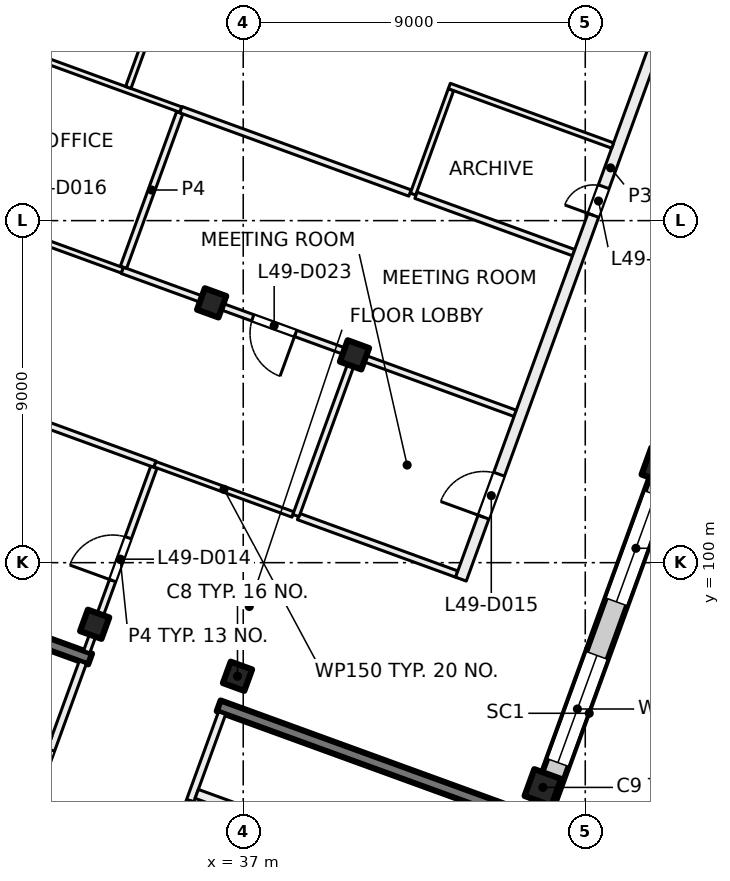
"""IFC4 building model, lengths in metres.
Left out: names, types, materials, properties, quantities, classifications, styles, units other than length and angle.
Written with IfcOpenShell. Run it as: python <this file> out.ifc"""

import sys

from ifc_helpers import new_model, si_unit, direction, frame, frame_2d, origin, origin_2d, place, context, subcontext, project, spatial, rectangle, extrude, element, fill, save


model = new_model("IFC4")
c1 = context("Model", 3, precision=1e-05, world=origin(), true_north=direction((0.0, 1.0)))
c2 = subcontext(c1, "Body", "Model", "MODEL_VIEW")
j1 = project(units=[si_unit("LENGTHUNIT", "METRE"), si_unit("PLANEANGLEUNIT", "RADIAN")], contexts=[c1])
p1 = place(None, origin())
s1 = spatial("IfcSite", under=j1, at=p1, CompositionType="ELEMENT")
p2 = place(p1, origin())
s2 = spatial("IfcBuilding", under=s1, at=p2, CompositionType="ELEMENT")
p3 = place(p2, frame((0.0, 0.0, 208.0)))
s3 = spatial("IfcBuildingStorey", under=s2, at=p3, CompositionType="ELEMENT", Elevation=208.0)
for number, where, z_axis, x_axis in (
    (1, (39.927, 105.468, 0.0), (0.0, 0.0, 1.0), (-0.342, -0.94, 0.0)),
    (2, (36.849, 97.011, 0.0), (0.0, 0.0, 1.0), (-0.342, -0.94, 0.0)),
    (3, (36.169, 106.836, 0.0), (0.0, 0.0, 1.0), (-0.342, -0.94, 0.0)),
    (4, (33.091, 98.379, 0.0), (0.0, 0.0, 1.0), (-0.342, -0.94, 0.0)),
):
    element("IfcColumn", number, at=place(p3, frame(where, z_axis=z_axis, x_axis=x_axis)), inside=s3, PredefinedType="COLUMN", context=c2, shape_type="SweptSolid", body=[
        extrude(rectangle(XDim=0.6, YDim=0.6, at=origin_2d()), origin(), (0.0, 0.0, 1.0), 4.0),
    ])
for number, where, z_axis, x_axis in (
    (5, (47.962, 102.544, 0.0), (0.0, 0.0, 1.0), (-0.342, -0.94, 0.0)),
    (6, (44.884, 94.087, 0.0), (0.0, 0.0, 1.0), (-0.342, -0.94, 0.0)),
):
    element("IfcColumn", number, at=place(p3, frame(where, z_axis=z_axis, x_axis=x_axis)), inside=s3, PredefinedType="COLUMN", context=c2, shape_type="SweptSolid", body=[
        extrude(rectangle(XDim=0.75, YDim=0.75, at=origin_2d()), origin(), (0.0, 0.0, 1.0), 4.0),
    ])
p4 = place(p3, frame((41.874, 85.232, 0.0), z_axis=(0.0, 0.0, 1.0), x_axis=(0.342020437038, 0.939692513883, 0.0)))
e7 = element("IfcWall", 7, at=p4, inside=s3, PredefinedType="SHEAR", context=c2, shape_type="SweptSolid", body=[
    extrude(rectangle(XDim=8.975, YDim=0.5, at=frame_2d((4.487, 0.0))), origin(), (0.0, 0.0, 1.0), 4.0),
])
p5 = place(p3, frame((44.529, 93.258, 0.0), z_axis=(0.0, 0.0, 1.0), x_axis=(-0.9396917844, 0.342022441267, 0.0)))
e8 = element("IfcWall", 8, at=p5, inside=s3, PredefinedType="SHEAR", context=c2, shape_type="SweptSolid", body=[
    extrude(rectangle(XDim=8.7, YDim=0.3, at=frame_2d((4.35, 0.0))), origin(), (0.0, 0.0, 1.0), 4.0),
])
p6 = place(p3, frame((32.971, 97.465, 0.0), z_axis=(0.0, 0.0, 1.0), x_axis=(-0.939695066972, 0.34201342241, 0.0)))
e9 = element("IfcWall", 9, at=p6, inside=s3, PredefinedType="SHEAR", context=c2, shape_type="SweptSolid", body=[
    extrude(rectangle(XDim=8.7, YDim=0.3, at=frame_2d((4.35, 0.0))), origin(), (0.0, 0.0, 1.0), 4.0),
])
p7 = place(p3, frame((52.212, 113.783, 0.0), z_axis=(0.0, 0.0, 1.0), x_axis=(-0.34202521188, -0.939690775968, 0.0)))
e10 = element("IfcWall", 10, at=p7, inside=s3, PredefinedType="SOLIDWALL", context=c2, shape_type="SweptSolid", body=[
    extrude(rectangle(XDim=21.745, YDim=0.6, at=frame_2d((10.873, 0.0))), origin(), (0.0, 0.0, 1.0), 3.625),
])
p8 = place(p7, frame((3.765, 0.0, 0.9)))
e11 = element("IfcOpeningElement", 11, at=p8, cuts=e10, PredefinedType="OPENING", context=c2, shape_type="SweptSolid", body=[
    extrude(rectangle(XDim=3.0, YDim=2.4, at=frame_2d((1.5, 1.2))), frame((0.0, 0.31, 0.0), z_axis=(0.0, -1.0, 0.0), x_axis=(1.0, 0.0, 0.0)), (0.0, 0.0, 1.0), 0.62),
])
p9 = place(p7, frame((8.265, 0.0, 0.9)))
e12 = element("IfcOpeningElement", 12, at=p9, cuts=e10, PredefinedType="OPENING", context=c2, shape_type="SweptSolid", body=[
    extrude(rectangle(XDim=3.0, YDim=2.4, at=frame_2d((1.5, 1.2))), frame((0.0, 0.31, 0.0), z_axis=(0.0, -1.0, 0.0), x_axis=(1.0, 0.0, 0.0)), (0.0, 0.0, 1.0), 0.62),
])
p10 = place(p7, frame((12.765, 0.0, 0.9)))
e13 = element("IfcOpeningElement", 13, at=p10, cuts=e10, PredefinedType="OPENING", context=c2, shape_type="SweptSolid", body=[
    extrude(rectangle(XDim=3.0, YDim=2.4, at=frame_2d((1.5, 1.2))), frame((0.0, 0.31, 0.0), z_axis=(0.0, -1.0, 0.0), x_axis=(1.0, 0.0, 0.0)), (0.0, 0.0, 1.0), 0.62),
])
p11 = place(p7, frame((17.265, 0.0, 0.9)))
e14 = element("IfcOpeningElement", 14, at=p11, cuts=e10, PredefinedType="OPENING", context=c2, shape_type="SweptSolid", body=[
    extrude(rectangle(XDim=3.0, YDim=2.4, at=frame_2d((1.5, 1.2))), frame((0.0, 0.31, 0.0), z_axis=(0.0, -1.0, 0.0), x_axis=(1.0, 0.0, 0.0)), (0.0, 0.0, 1.0), 0.62),
])
p12 = place(p3, frame((24.666, 100.669, 0.0), z_axis=(0.0, 0.0, 1.0), x_axis=(0.34201964167, 0.939692803373, 0.0)))
e15 = element("IfcWall", 15, at=p12, inside=s3, PredefinedType="SOLIDWALL", context=c2, shape_type="SweptSolid", body=[
    extrude(rectangle(XDim=32.884, YDim=0.6, at=frame_2d((16.442, 0.0))), origin(), (0.0, 0.0, 1.0), 3.625),
])
p13 = place(p12, frame((1.48, 0.0, 0.9)))
e16 = element("IfcOpeningElement", 16, at=p13, cuts=e15, PredefinedType="OPENING", context=c2, shape_type="SweptSolid", body=[
    extrude(rectangle(XDim=3.0, YDim=2.4, at=frame_2d((1.5, 1.2))), frame((0.0, 0.31, 0.0), z_axis=(0.0, -1.0, 0.0), x_axis=(1.0, 0.0, 0.0)), (0.0, 0.0, 1.0), 0.62),
])
p14 = place(p12, frame((5.98, 0.0, 0.9)))
e17 = element("IfcOpeningElement", 17, at=p14, cuts=e15, PredefinedType="OPENING", context=c2, shape_type="SweptSolid", body=[
    extrude(rectangle(XDim=3.0, YDim=2.4, at=frame_2d((1.5, 1.2))), frame((0.0, 0.31, 0.0), z_axis=(0.0, -1.0, 0.0), x_axis=(1.0, 0.0, 0.0)), (0.0, 0.0, 1.0), 0.62),
])
p15 = place(p12, frame((10.48, 0.0, 0.9)))
e18 = element("IfcOpeningElement", 18, at=p15, cuts=e15, PredefinedType="OPENING", context=c2, shape_type="SweptSolid", body=[
    extrude(rectangle(XDim=3.0, YDim=2.4, at=frame_2d((1.5, 1.2))), frame((0.0, 0.31, 0.0), z_axis=(0.0, -1.0, 0.0), x_axis=(1.0, 0.0, 0.0)), (0.0, 0.0, 1.0), 0.62),
])
p16 = place(p12, frame((14.98, 0.0, 0.9)))
e19 = element("IfcOpeningElement", 19, at=p16, cuts=e15, PredefinedType="OPENING", context=c2, shape_type="SweptSolid", body=[
    extrude(rectangle(XDim=3.0, YDim=2.4, at=frame_2d((1.5, 1.2))), frame((0.0, 0.31, 0.0), z_axis=(0.0, -1.0, 0.0), x_axis=(1.0, 0.0, 0.0)), (0.0, 0.0, 1.0), 0.62),
])
p17 = place(p12, frame((19.48, 0.0, 0.9)))
e20 = element("IfcOpeningElement", 20, at=p17, cuts=e15, PredefinedType="OPENING", context=c2, shape_type="SweptSolid", body=[
    extrude(rectangle(XDim=3.0, YDim=2.4, at=frame_2d((1.5, 1.2))), frame((0.0, 0.31, 0.0), z_axis=(0.0, -1.0, 0.0), x_axis=(1.0, 0.0, 0.0)), (0.0, 0.0, 1.0), 0.62),
])
p18 = place(p12, frame((23.98, 0.0, 0.9)))
e21 = element("IfcOpeningElement", 21, at=p18, cuts=e15, PredefinedType="OPENING", context=c2, shape_type="SweptSolid", body=[
    extrude(rectangle(XDim=3.0, YDim=2.4, at=frame_2d((1.5, 1.2))), frame((0.0, 0.31, 0.0), z_axis=(0.0, -1.0, 0.0), x_axis=(1.0, 0.0, 0.0)), (0.0, 0.0, 1.0), 0.62),
])
p19 = place(p12, frame((28.48, 0.0, 0.9)))
e22 = element("IfcOpeningElement", 22, at=p19, cuts=e15, PredefinedType="OPENING", context=c2, shape_type="SweptSolid", body=[
    extrude(rectangle(XDim=3.0, YDim=2.4, at=frame_2d((1.5, 1.2))), frame((0.0, 0.31, 0.0), z_axis=(0.0, -1.0, 0.0), x_axis=(1.0, 0.0, 0.0)), (0.0, 0.0, 1.0), 0.62),
])
p20 = place(p3, frame((31.427, 93.663, 0.0), z_axis=(0.0, 0.0, 1.0), x_axis=(0.342030870568, 0.93968871632, 0.0)))
e23 = element("IfcWall", 23, at=p20, inside=s3, PredefinedType="PARTITIONING", context=c2, shape_type="SweptSolid", body=[
    extrude(rectangle(XDim=3.95, YDim=0.2, at=frame_2d((1.975, 0.0))), origin(), (0.0, 0.0, 1.0), 3.625),
])
p21 = place(p20, frame((0.3, 0.0, 0.0)))
e24 = element("IfcOpeningElement", 24, at=p21, cuts=e23, PredefinedType="OPENING", context=c2, shape_type="SweptSolid", body=[
    extrude(rectangle(XDim=1.2, YDim=2.1, at=frame_2d((0.6, 1.05))), frame((0.0, 0.11, 0.0), z_axis=(0.0, -1.0, 0.0), x_axis=(1.0, 0.0, 0.0)), (0.0, 0.0, 1.0), 0.22),
])
p22 = place(p3, frame((23.983, 98.208, 0.0), z_axis=(0.0, 0.0, 1.0), x_axis=(0.939699751196, -0.342000552051, 0.0)))
e25 = element("IfcWall", 25, at=p22, inside=s3, PredefinedType="PARTITIONING", context=c2, shape_type="SweptSolid", body=[
    extrude(rectangle(XDim=8.45, YDim=0.25, at=frame_2d((4.225, 0.0))), origin(), (0.0, 0.0, 1.0), 3.625),
])
p23 = place(p22, frame((6.665, 0.0, 0.0)))
e26 = element("IfcOpeningElement", 26, at=p23, cuts=e25, PredefinedType="OPENING", context=c2, shape_type="SweptSolid", body=[
    extrude(rectangle(XDim=0.8, YDim=2.1, at=frame_2d((0.4, 1.05))), frame((0.0, 0.135, 0.0), z_axis=(0.0, -1.0, 0.0), x_axis=(1.0, 0.0, 0.0)), (0.0, 0.0, 1.0), 0.27),
])
p24 = place(p22, frame((2.29, 0.0, 0.0)))
e27 = element("IfcOpeningElement", 27, at=p24, cuts=e25, PredefinedType="OPENING", context=c2, shape_type="SweptSolid", body=[
    extrude(rectangle(XDim=1.0, YDim=2.1, at=frame_2d((0.5, 1.05))), frame((0.0, 0.135, 0.0), z_axis=(0.0, -1.0, 0.0), x_axis=(1.0, 0.0, 0.0)), (0.0, 0.0, 1.0), 0.27),
])
p25 = place(p3, frame((36.443, 96.041, 0.0), z_axis=(0.0, 0.0, 1.0), x_axis=(-0.341996156931, -0.939701350773, 0.0)))
e28 = element("IfcWall", 28, at=p25, inside=s3, PredefinedType="PARTITIONING", context=c2, shape_type="SweptSolid", body=[
    extrude(rectangle(XDim=3.95, YDim=0.2, at=frame_2d((1.975, 0.0))), origin(), (0.0, 0.0, 1.0), 3.625),
])
p26 = place(p25, frame((2.45, 0.0, 0.0)))
e29 = element("IfcOpeningElement", 29, at=p26, cuts=e28, PredefinedType="OPENING", context=c2, shape_type="SweptSolid", body=[
    extrude(rectangle(XDim=1.2, YDim=2.1, at=frame_2d((0.6, 1.05))), frame((0.0, 0.11, 0.0), z_axis=(0.0, -1.0, 0.0), x_axis=(1.0, 0.0, 0.0)), (0.0, 0.0, 1.0), 0.22),
])
p27 = place(p3, frame((35.776, 93.916, 0.0), z_axis=(0.0, 0.0, 1.0), x_axis=(0.939690465531, -0.342026064782, 0.0)))
e30 = element("IfcWall", 30, at=p27, inside=s3, PredefinedType="PARTITIONING", context=c2, shape_type="SweptSolid", body=[
    extrude(rectangle(XDim=8.45, YDim=0.25, at=frame_2d((4.225, 0.0))), origin(), (0.0, 0.0, 1.0), 3.625),
])
p28 = place(p27, frame((3.825, 0.0, 0.0)))
e31 = element("IfcOpeningElement", 31, at=p28, cuts=e30, PredefinedType="OPENING", context=c2, shape_type="SweptSolid", body=[
    extrude(rectangle(XDim=0.8, YDim=2.1, at=frame_2d((0.4, 1.05))), frame((0.0, 0.135, 0.0), z_axis=(0.0, -1.0, 0.0), x_axis=(1.0, 0.0, 0.0)), (0.0, 0.0, 1.0), 0.27),
])
p29 = place(p3, frame((34.677, 102.59, 0.0), z_axis=(0.0, 0.0, 1.0), x_axis=(-0.939706509432, 0.341981982173, 0.0)))
e32 = element("IfcWall", 32, at=p29, inside=s3, PredefinedType="PARTITIONING", context=c2, shape_type="SweptSolid", body=[
    extrude(rectangle(XDim=8.45, YDim=0.175, at=frame_2d((4.225, 0.0))), origin(), (0.0, 0.0, 1.0), 3.625),
])
p30 = place(p29, frame((3.324, 0.0, 0.0)))
e33 = element("IfcOpeningElement", 33, at=p30, cuts=e32, PredefinedType="OPENING", context=c2, shape_type="SweptSolid", body=[
    extrude(rectangle(XDim=1.8, YDim=2.1, at=frame_2d((0.9, 1.05))), frame((0.0, 0.097, 0.0), z_axis=(0.0, -1.0, 0.0), x_axis=(1.0, 0.0, 0.0)), (0.0, 0.0, 1.0), 0.195),
])
p31 = place(p3, frame((29.814, 113.938, 0.0), z_axis=(0.0, 0.0, 1.0), x_axis=(0.939699162475, -0.342002169647, 0.0)))
e34 = element("IfcWall", 34, at=p31, inside=s3, PredefinedType="PARTITIONING", context=c2, shape_type="SweptSolid", body=[
    extrude(rectangle(XDim=5.901, YDim=0.15, at=frame_2d((2.95, 0.0))), origin(), (0.0, 0.0, 1.0), 3.625),
])
p32 = place(p3, frame((33.819, 107.691, 0.0), z_axis=(0.0, 0.0, 1.0), x_axis=(-0.939684641746, 0.342042064762, 0.0)))
e35 = element("IfcWall", 35, at=p32, inside=s3, PredefinedType="PARTITIONING", context=c2, shape_type="SweptSolid", body=[
    extrude(rectangle(XDim=5.9, YDim=0.15, at=frame_2d((2.95, 0.0))), origin(), (0.0, 0.0, 1.0), 3.625),
])
p33 = place(p32, frame((2.45, 0.0, 0.0)))
e36 = element("IfcOpeningElement", 36, at=p33, cuts=e35, PredefinedType="OPENING", context=c2, shape_type="SweptSolid", body=[
    extrude(rectangle(XDim=1.0, YDim=2.1, at=frame_2d((0.5, 1.05))), frame((0.0, 0.085, 0.0), z_axis=(0.0, -1.0, 0.0), x_axis=(1.0, 0.0, 0.0)), (0.0, 0.0, 1.0), 0.17),
])
p34 = place(p3, frame((44.156, 103.929, 0.0), z_axis=(0.0, 0.0, 1.0), x_axis=(-0.939703317948, 0.341990751683, 0.0)))
e37 = element("IfcWall", 37, at=p34, inside=s3, PredefinedType="PARTITIONING", context=c2, shape_type="SweptSolid", body=[
    extrude(rectangle(XDim=11.0, YDim=0.175, at=frame_2d((5.5, 0.0))), origin(), (0.0, 0.0, 1.0), 3.625),
])
p35 = place(p34, frame((6.149, 0.0, 0.0)))
e38 = element("IfcOpeningElement", 38, at=p35, cuts=e37, PredefinedType="OPENING", context=c2, shape_type="SweptSolid", body=[
    extrude(rectangle(XDim=1.2, YDim=2.1, at=frame_2d((0.6, 1.05))), frame((0.0, 0.097, 0.0), z_axis=(0.0, -1.0, 0.0), x_axis=(1.0, 0.0, 0.0)), (0.0, 0.0, 1.0), 0.195),
])
p36 = place(p3, frame((32.881, 97.657, 0.0), z_axis=(0.0, 0.0, 1.0), x_axis=(0.342058204353, 0.939678766832, 0.0)))
e39 = element("IfcWall", 39, at=p36, inside=s3, PredefinedType="PARTITIONING", context=c2, shape_type="SweptSolid", body=[
    extrude(rectangle(XDim=5.163, YDim=0.175, at=frame_2d((2.581, 0.0))), origin(), (0.0, 0.0, 1.0), 3.625),
])
p37 = place(p36, frame((1.991, 0.0, 0.0)))
e40 = element("IfcOpeningElement", 40, at=p37, cuts=e39, PredefinedType="OPENING", context=c2, shape_type="SweptSolid", body=[
    extrude(rectangle(XDim=1.2, YDim=2.1, at=frame_2d((0.6, 1.05))), frame((0.0, 0.097, 0.0), z_axis=(0.0, -1.0, 0.0), x_axis=(1.0, 0.0, 0.0)), (0.0, 0.0, 1.0), 0.195),
])
p38 = place(p3, frame((34.677, 102.59, 0.0), z_axis=(0.0, 0.0, 1.0), x_axis=(0.939688259666, -0.342032125166, 0.0)))
e41 = element("IfcWall", 41, at=p38, inside=s3, PredefinedType="PARTITIONING", context=c2, shape_type="SweptSolid", body=[
    extrude(rectangle(XDim=3.865, YDim=0.15, at=frame_2d((1.933, 0.0))), origin(), (0.0, 0.0, 1.0), 3.625),
])
p39 = place(p3, frame((35.329, 111.838, 0.0), z_axis=(0.0, 0.0, 1.0), x_axis=(-0.342114607243, -0.939658233355, 0.0)))
e42 = element("IfcWall", 42, at=p39, inside=s3, PredefinedType="PARTITIONING", context=c2, shape_type="SweptSolid", body=[
    extrude(rectangle(XDim=4.326, YDim=0.175, at=frame_2d((2.163, 0.0))), origin(), (0.0, 0.0, 1.0), 3.625),
])
p40 = place(p3, frame((37.053, 120.96, 0.0), z_axis=(0.0, 0.0, 1.0), x_axis=(-0.341997891731, -0.939700719406, 0.0)))
e43 = element("IfcWall", 43, at=p40, inside=s3, PredefinedType="PARTITIONING", context=c2, shape_type="SweptSolid", body=[
    extrude(rectangle(XDim=9.0, YDim=0.15, at=frame_2d((4.5, 0.0))), origin(), (0.0, 0.0, 1.0), 3.625),
])
p41 = place(p40, frame((6.297, 0.0, 0.0)))
e44 = element("IfcOpeningElement", 44, at=p41, cuts=e43, PredefinedType="OPENING", context=c2, shape_type="SweptSolid", body=[
    extrude(rectangle(XDim=1.0, YDim=2.1, at=frame_2d((0.5, 1.05))), frame((0.0, 0.085, 0.0), z_axis=(0.0, -1.0, 0.0), x_axis=(1.0, 0.0, 0.0)), (0.0, 0.0, 1.0), 0.17),
])
p42 = place(p40, frame((1.824, 0.0, 0.0)))
e45 = element("IfcOpeningElement", 45, at=p42, cuts=e43, PredefinedType="OPENING", context=c2, shape_type="SweptSolid", body=[
    extrude(rectangle(XDim=1.0, YDim=2.1, at=frame_2d((0.5, 1.05))), frame((0.0, 0.085, 0.0), z_axis=(0.0, -1.0, 0.0), x_axis=(1.0, 0.0, 0.0)), (0.0, 0.0, 1.0), 0.17),
])
p43 = place(p3, frame((38.455, 101.214, 0.0), z_axis=(0.0, 0.0, 1.0), x_axis=(0.939738687483, -0.341893549585, 0.0)))
e46 = element("IfcWall", 46, at=p43, inside=s3, PredefinedType="PARTITIONING", context=c2, shape_type="SweptSolid", body=[
    extrude(rectangle(XDim=4.429, YDim=0.175, at=frame_2d((2.214, 0.0))), origin(), (0.0, 0.0, 1.0), 3.625),
])
p44 = place(p3, frame((39.897, 105.386, 0.0), z_axis=(0.0, 0.0, 1.0), x_axis=(-0.341951828534, -0.939717482524, 0.0)))
e47 = element("IfcWall", 47, at=p44, inside=s3, PredefinedType="PARTITIONING", context=c2, shape_type="SweptSolid", body=[
    extrude(rectangle(XDim=4.413, YDim=0.175, at=frame_2d((2.207, 0.0))), origin(), (0.0, 0.0, 1.0), 3.625),
])
p45 = place(p3, frame((41.546, 109.667, 0.0), z_axis=(0.0, 0.0, 1.0), x_axis=(0.939704600082, -0.341987228685, 0.0)))
e48 = element("IfcWall", 48, at=p45, inside=s3, PredefinedType="PARTITIONING", context=c2, shape_type="SweptSolid", body=[
    extrude(rectangle(XDim=4.415, YDim=0.175, at=frame_2d((2.208, 0.0))), origin(), (0.0, 0.0, 1.0), 3.625),
])
p46 = place(p3, frame((41.388, 109.726, 0.0), z_axis=(0.0, 0.0, 1.0), x_axis=(-0.939720073348, 0.341944708609, 0.0)))
e49 = element("IfcWall", 49, at=p46, inside=s3, PredefinedType="PARTITIONING", context=c2, shape_type="SweptSolid", body=[
    extrude(rectangle(XDim=6.416, YDim=0.175, at=frame_2d((3.208, 0.0))), origin(), (0.0, 0.0, 1.0), 3.625),
])
p47 = place(p3, frame((42.467, 112.446, 0.0), z_axis=(0.0, 0.0, 1.0), x_axis=(-0.341850278959, -0.939754428974, 0.0)))
e50 = element("IfcWall", 50, at=p47, inside=s3, PredefinedType="PARTITIONING", context=c2, shape_type="SweptSolid", body=[
    extrude(rectangle(XDim=2.925, YDim=0.15, at=frame_2d((1.463, 0.0))), origin(), (0.0, 0.0, 1.0), 3.625),
])
p48 = place(p3, frame((42.728, 99.567, 0.0), z_axis=(0.0, 0.0, 1.0), x_axis=(0.342015412648, 0.939694342598, 0.0)))
e51 = element("IfcWall", 51, at=p48, inside=s3, PredefinedType="PARTITIONING", context=c2, shape_type="SweptSolid", body=[
    extrude(rectangle(XDim=23.031, YDim=0.3, at=frame_2d((11.516, 0.0))), origin(), (0.0, 0.0, 1.0), 3.625),
])
p49 = place(p48, frame((1.738, 0.0, 0.0)))
e52 = element("IfcOpeningElement", 52, at=p49, cuts=e51, PredefinedType="OPENING", context=c2, shape_type="SweptSolid", body=[
    extrude(rectangle(XDim=1.2, YDim=2.1, at=frame_2d((0.6, 1.05))), frame((0.0, 0.16, 0.0), z_axis=(0.0, -1.0, 0.0), x_axis=(1.0, 0.0, 0.0)), (0.0, 0.0, 1.0), 0.32),
])
p50 = place(p48, frame((10.187, 0.0, 0.0)))
e53 = element("IfcOpeningElement", 53, at=p50, cuts=e51, PredefinedType="OPENING", context=c2, shape_type="SweptSolid", body=[
    extrude(rectangle(XDim=0.8, YDim=2.1, at=frame_2d((0.4, 1.05))), frame((0.0, 0.16, 0.0), z_axis=(0.0, -1.0, 0.0), x_axis=(1.0, 0.0, 0.0)), (0.0, 0.0, 1.0), 0.32),
])
p51 = place(p48, frame((16.437, 0.0, 0.0)))
e54 = element("IfcOpeningElement", 54, at=p51, cuts=e51, PredefinedType="OPENING", context=c2, shape_type="SweptSolid", body=[
    extrude(rectangle(XDim=1.8, YDim=2.1, at=frame_2d((0.9, 1.05))), frame((0.0, 0.16, 0.0), z_axis=(0.0, -1.0, 0.0), x_axis=(1.0, 0.0, 0.0)), (0.0, 0.0, 1.0), 0.32),
])
p52 = place(p3, frame((46.721, 110.976, 0.0), z_axis=(0.0, 0.0, 1.0), x_axis=(-0.939578187104, 0.342334383781, 0.0)))
e55 = element("IfcWall", 55, at=p52, inside=s3, PredefinedType="PARTITIONING", context=c2, shape_type="SweptSolid", body=[
    extrude(rectangle(XDim=4.574, YDim=0.15, at=frame_2d((2.287, 0.0))), origin(), (0.0, 0.0, 1.0), 3.625),
])
p53 = place(p10, origin())
e56 = element("IfcWindow", 56, at=p53, inside=s3, PartitioningType="SINGLE_PANEL", PredefinedType="WINDOW", context=c2, shape_type="SweptSolid", body=[
    extrude(rectangle(XDim=3.0, YDim=2.4, at=frame_2d((1.5, 1.2))), frame((0.0, 0.03, 0.0), z_axis=(0.0, -1.0, 0.0), x_axis=(1.0, 0.0, 0.0)), (0.0, 0.0, 1.0), 0.06),
])
fill(e13, e56)
p54 = place(p11, origin())
e57 = element("IfcWindow", 57, at=p54, inside=s3, PartitioningType="SINGLE_PANEL", PredefinedType="WINDOW", context=c2, shape_type="SweptSolid", body=[
    extrude(rectangle(XDim=3.0, YDim=2.4, at=frame_2d((1.5, 1.2))), frame((0.0, 0.03, 0.0), z_axis=(0.0, -1.0, 0.0), x_axis=(1.0, 0.0, 0.0)), (0.0, 0.0, 1.0), 0.06),
])
fill(e14, e57)
p55 = place(p21, origin())
e58 = element("IfcDoor", 58, at=p55, inside=s3, OperationType="DOUBLE_DOOR_SINGLE_SWING", PredefinedType="DOOR", context=c2, shape_type="SweptSolid", body=[
    extrude(rectangle(XDim=1.2, YDim=2.1, at=frame_2d((0.6, 1.05))), frame((0.0, 0.025, 0.0), z_axis=(0.0, -1.0, 0.0), x_axis=(1.0, 0.0, 0.0)), (0.0, 0.0, 1.0), 0.05),
])
fill(e24, e58)
p56 = place(p26, origin())
e59 = element("IfcDoor", 59, at=p56, inside=s3, OperationType="DOUBLE_DOOR_SINGLE_SWING", PredefinedType="DOOR", context=c2, shape_type="SweptSolid", body=[
    extrude(rectangle(XDim=1.2, YDim=2.1, at=frame_2d((0.6, 1.05))), frame((0.0, 0.025, 0.0), z_axis=(0.0, -1.0, 0.0), x_axis=(1.0, 0.0, 0.0)), (0.0, 0.0, 1.0), 0.05),
])
fill(e29, e59)
p57 = place(p37, origin())
e60 = element("IfcDoor", 60, at=p57, inside=s3, OperationType="DOUBLE_DOOR_SINGLE_SWING", PredefinedType="DOOR", context=c2, shape_type="SweptSolid", body=[
    extrude(rectangle(XDim=1.2, YDim=2.1, at=frame_2d((0.6, 1.05))), frame((0.0, 0.025, 0.0), z_axis=(0.0, -1.0, 0.0), x_axis=(1.0, 0.0, 0.0)), (0.0, 0.0, 1.0), 0.05),
])
fill(e40, e60)
p58 = place(p49, origin())
e61 = element("IfcDoor", 61, at=p58, inside=s3, OperationType="DOUBLE_DOOR_SINGLE_SWING", PredefinedType="DOOR", context=c2, shape_type="SweptSolid", body=[
    extrude(rectangle(XDim=1.2, YDim=2.1, at=frame_2d((0.6, 1.05))), frame((0.0, 0.025, 0.0), z_axis=(0.0, -1.0, 0.0), x_axis=(1.0, 0.0, 0.0)), (0.0, 0.0, 1.0), 0.05),
])
fill(e52, e61)
p59 = place(p50, origin())
e62 = element("IfcDoor", 62, at=p59, inside=s3, OperationType="SINGLE_SWING_LEFT", PredefinedType="DOOR", context=c2, shape_type="SweptSolid", body=[
    extrude(rectangle(XDim=0.8, YDim=2.1, at=frame_2d((0.4, 1.05))), frame((0.0, 0.025, 0.0), z_axis=(0.0, -1.0, 0.0), x_axis=(1.0, 0.0, 0.0)), (0.0, 0.0, 1.0), 0.05),
])
fill(e53, e62)
p60 = place(p35, origin())
e63 = element("IfcDoor", 63, at=p60, inside=s3, OperationType="DOUBLE_DOOR_SINGLE_SWING", PredefinedType="DOOR", context=c2, shape_type="SweptSolid", body=[
    extrude(rectangle(XDim=1.2, YDim=2.1, at=frame_2d((0.6, 1.05))), frame((0.0, 0.025, 0.0), z_axis=(0.0, -1.0, 0.0), x_axis=(1.0, 0.0, 0.0)), (0.0, 0.0, 1.0), 0.05),
])
fill(e38, e63)
save(model, sys.argv[1])
